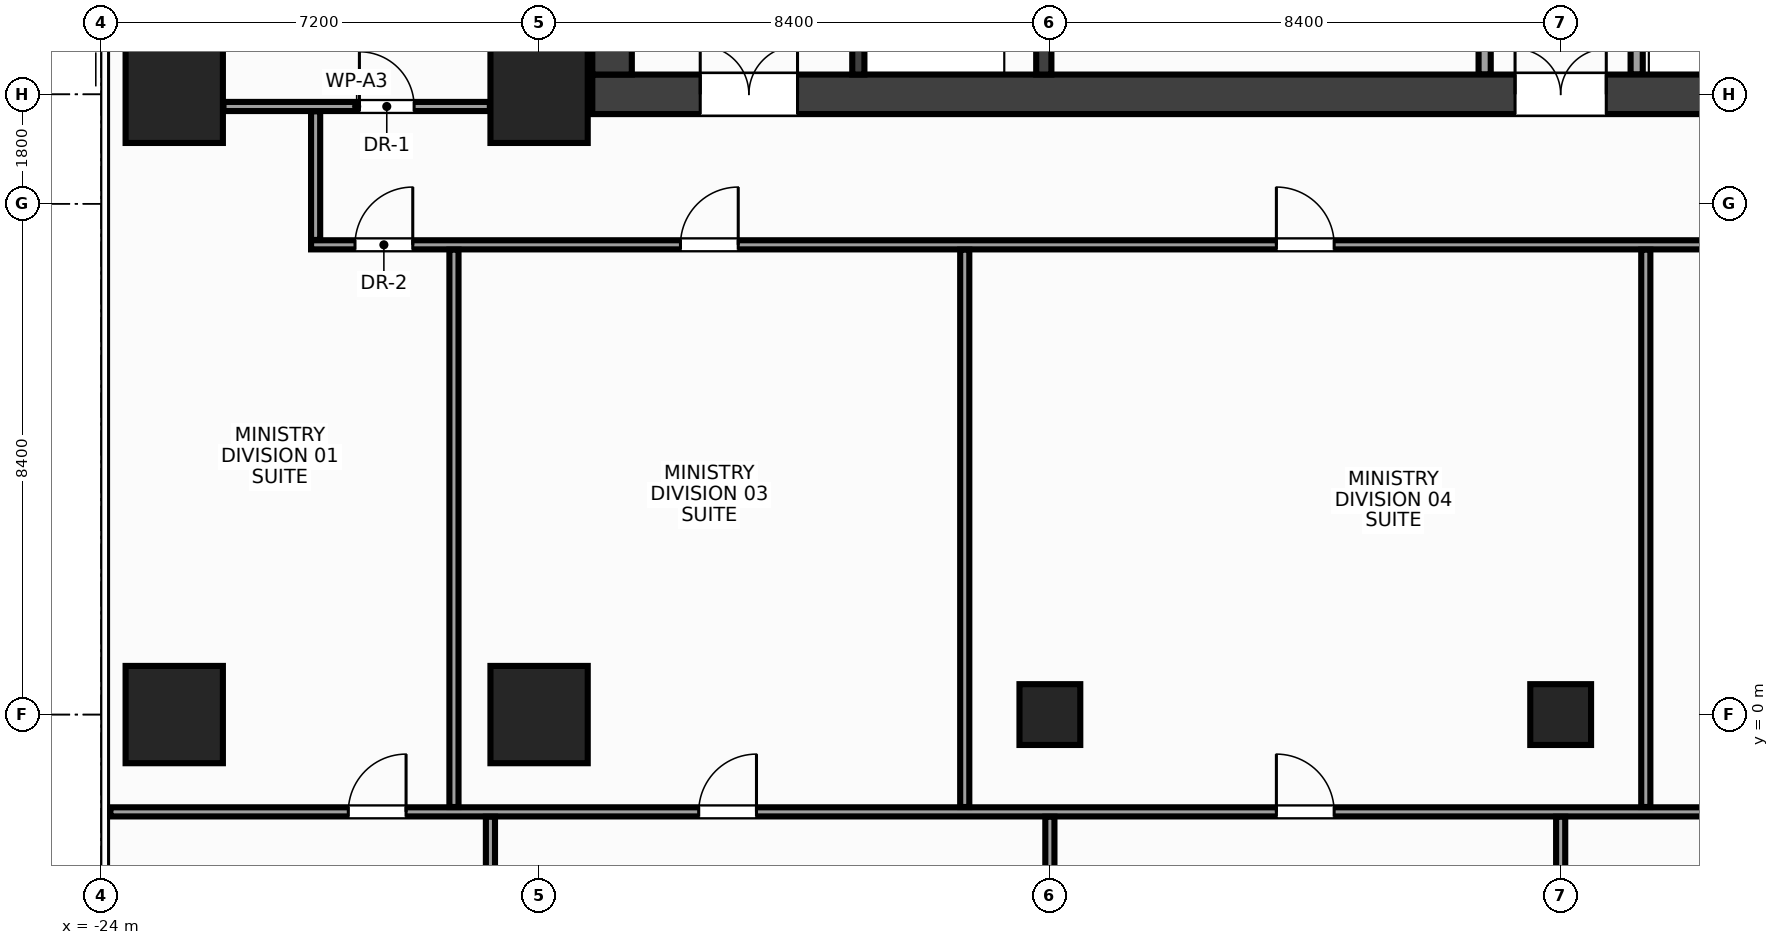
"""IFC4 building model, lengths in metres.
Left out: names, types, materials, properties, quantities, classifications, styles, units other than length and angle.
Written with IfcOpenShell. Run it as: python <this file> out.ifc"""

import sys

from ifc_helpers import new_model, si_unit, direction, frame, frame_2d, origin, origin_with_axes, origin_2d, place, context, subcontext, project, spatial, rectangle, hollow_rectangle, extrude, source, transform, mapped, element, fill, save


model = new_model("IFC4")
c1 = context("Model", 3, precision=1e-05, world=origin(), true_north=direction((0.0, 1.0)))
c2 = subcontext(c1, "Body", "Model", "MODEL_VIEW")
j1 = project(units=[si_unit("LENGTHUNIT", "METRE"), si_unit("PLANEANGLEUNIT", "RADIAN")], contexts=[c1])
p1 = place(None, origin())
s1 = spatial("IfcSite", under=j1, at=p1, CompositionType="ELEMENT")
p2 = place(p1, origin())
s2 = spatial("IfcBuilding", under=s1, at=p2, CompositionType="ELEMENT")
p3 = place(p2, frame((0.0, 0.0, 146.0)))
s3 = spatial("IfcBuildingStorey", under=s2, at=p3, CompositionType="ELEMENT", Elevation=146.0)
m1 = source(origin(), c2, "Body", "SweptSolid", [
    extrude(rectangle(XDim=31.85, YDim=0.65, at=frame_2d((15.925, 0.0))), origin(), (0.0, 0.0, 1.0), 3.6),
])
p4 = place(p3, frame((-15.925, 10.2, 0.0), z_axis=(0.0, 0.0, 1.0), x_axis=(1.0, 0.0, 0.0)))
e1 = element("IfcWall", 1, at=p4, inside=s3, PredefinedType="SHEAR", context=c2, shape_type="MappedRepresentation", body=[
    mapped(m1, transform((0.0, 0.0, 0.0), x_axis=(1.0, 0.0, 0.0), y_axis=(0.0, 1.0, 0.0), z_axis=(0.0, 0.0, 1.0), scale=1.0)),
])
p5 = place(p4, frame((1.775, 0.0, 0.0)))
e2 = element("IfcOpeningElement", 2, at=p5, cuts=e1, PredefinedType="OPENING", context=c2, shape_type="SweptSolid", body=[
    extrude(rectangle(XDim=1.6, YDim=2.15, at=frame_2d((0.8, 1.075))), frame((0.0, 0.337, 0.0), z_axis=(0.0, -1.0, 0.0), x_axis=(1.0, 0.0, 0.0)), (0.0, 0.0, 1.0), 0.674),
])
p6 = place(p4, frame((28.475, 0.0, 0.0)))
e3 = element("IfcOpeningElement", 3, at=p6, cuts=e1, PredefinedType="OPENING", context=c2, shape_type="SweptSolid", body=[
    extrude(rectangle(XDim=1.6, YDim=2.15, at=frame_2d((0.8, 1.075))), frame((0.0, 0.337, 0.0), z_axis=(0.0, -1.0, 0.0), x_axis=(1.0, 0.0, 0.0)), (0.0, 0.0, 1.0), 0.674),
])
p7 = place(p4, frame((15.175, 0.0, 0.0)))
e4 = element("IfcOpeningElement", 4, at=p7, cuts=e1, PredefinedType="OPENING", context=c2, shape_type="SweptSolid", body=[
    extrude(rectangle(XDim=1.5, YDim=2.2, at=frame_2d((0.75, 1.1))), frame((0.0, 0.337, 0.0), z_axis=(0.0, -1.0, 0.0), x_axis=(1.0, 0.0, 0.0)), (0.0, 0.0, 1.0), 0.674),
])
m2 = source(origin(), c2, "Body", "SweptSolid", [
    extrude(rectangle(XDim=12.95, YDim=0.65, at=frame_2d((6.475, 0.0))), origin(), (0.0, 0.0, 1.0), 3.6),
])
p8 = place(p3, frame((-15.6, 10.525, 0.0), z_axis=(0.0, 0.0, 1.0), x_axis=(0.0, 1.0, 0.0)))
e5 = element("IfcWall", 5, at=p8, inside=s3, PredefinedType="SHEAR", context=c2, shape_type="MappedRepresentation", body=[
    mapped(m2, transform((0.0, 0.0, 0.0), x_axis=(1.0, 0.0, 0.0), y_axis=(0.0, 1.0, 0.0), z_axis=(0.0, 0.0, 1.0), scale=1.0)),
])
m3 = source(origin(), c2, "Body", "SweptSolid", [
    extrude(rectangle(XDim=12.95, YDim=0.25, at=frame_2d((6.475, 0.0))), origin(), (0.0, 0.0, 1.0), 3.6),
])
p9 = place(p3, frame((-8.5, 10.525, 0.0), z_axis=(0.0, 0.0, 1.0), x_axis=(0.0, 1.0, 0.0)))
e6 = element("IfcWall", 6, at=p9, inside=s3, PredefinedType="SHEAR", context=c2, shape_type="MappedRepresentation", body=[
    mapped(m3, transform((0.0, 0.0, 0.0), x_axis=(1.0, 0.0, 0.0), y_axis=(0.0, 1.0, 0.0), z_axis=(0.0, 0.0, 1.0), scale=1.0)),
])
p10 = place(p9, frame((4.145, 0.0, 0.0)))
e7 = element("IfcOpeningElement", 7, at=p10, cuts=e6, PredefinedType="OPENING", context=c2, shape_type="SweptSolid", body=[
    extrude(rectangle(XDim=1.1, YDim=2.15, at=frame_2d((0.55, 1.075))), frame((0.0, 0.137, 0.0), z_axis=(0.0, -1.0, 0.0), x_axis=(1.0, 0.0, 0.0)), (0.0, 0.0, 1.0), 0.274),
])
p11 = place(p9, frame((6.065, 0.0, 0.0)))
e8 = element("IfcOpeningElement", 8, at=p11, cuts=e6, PredefinedType="OPENING", context=c2, shape_type="SweptSolid", body=[
    extrude(rectangle(XDim=1.1, YDim=2.15, at=frame_2d((0.55, 1.075))), frame((0.0, 0.137, 0.0), z_axis=(0.0, -1.0, 0.0), x_axis=(1.0, 0.0, 0.0)), (0.0, 0.0, 1.0), 0.274),
])
p12 = place(p9, frame((7.985, 0.0, 0.0)))
e9 = element("IfcOpeningElement", 9, at=p12, cuts=e6, PredefinedType="OPENING", context=c2, shape_type="SweptSolid", body=[
    extrude(rectangle(XDim=1.1, YDim=2.15, at=frame_2d((0.55, 1.075))), frame((0.0, 0.137, 0.0), z_axis=(0.0, -1.0, 0.0), x_axis=(1.0, 0.0, 0.0)), (0.0, 0.0, 1.0), 0.274),
])
m4 = source(origin(), c2, "Body", "SweptSolid", [
    extrude(rectangle(XDim=3.125, YDim=0.2, at=frame_2d((1.562, 0.0))), origin(), (0.0, 0.0, 1.0), 3.6),
])
p13 = place(p3, frame((-11.55, 10.525, 0.0), z_axis=(0.0, 0.0, 1.0), x_axis=(0.0, 1.0, 0.0)))
e10 = element("IfcWall", 10, at=p13, inside=s3, PredefinedType="SHEAR", context=c2, shape_type="MappedRepresentation", body=[
    mapped(m4, transform((0.0, 0.0, 0.0), x_axis=(1.0, 0.0, 0.0), y_axis=(0.0, 1.0, 0.0), z_axis=(0.0, 0.0, 1.0), scale=1.0)),
])
p14 = place(p13, frame((0.9, 0.0, 0.0)))
e11 = element("IfcOpeningElement", 11, at=p14, cuts=e10, PredefinedType="OPENING", context=c2, shape_type="SweptSolid", body=[
    extrude(rectangle(XDim=1.1, YDim=2.15, at=frame_2d((0.55, 1.075))), frame((0.0, 0.112, 0.0), z_axis=(0.0, -1.0, 0.0), x_axis=(1.0, 0.0, 0.0)), (0.0, 0.0, 1.0), 0.224),
])
m5 = source(origin(), c2, "Body", "SweptSolid", [
    extrude(rectangle(XDim=1.6, YDim=1.6, at=origin_2d()), origin(), (0.0, 0.0, 1.0), 3.6),
])
for number, where, z_axis, x_axis in (
    (12, (-16.8, 0.0, 0.0), (0.0, 0.0, 1.0), (1.0, 0.0, 0.0)),
    (13, (-16.8, 10.2, 0.0), (0.0, 0.0, 1.0), (1.0, 0.0, 0.0)),
    (14, (-22.8, 0.0, 0.0), (0.0, 0.0, 1.0), (1.0, 0.0, 0.0)),
    (15, (-22.8, 10.2, 0.0), (0.0, 0.0, 1.0), (1.0, 0.0, 0.0)),
):
    element("IfcColumn", number, at=place(p3, frame(where, z_axis=z_axis, x_axis=x_axis)), inside=s3, PredefinedType="COLUMN", context=c2, shape_type="MappedRepresentation", body=[
        mapped(m5, transform((0.0, 0.0, 0.0), x_axis=(1.0, 0.0, 0.0), y_axis=(0.0, 1.0, 0.0), z_axis=(0.0, 0.0, 1.0), scale=1.0)),
    ])
m6 = source(origin(), c2, "Body", "SweptSolid", [
    extrude(hollow_rectangle(XDim=1.0, YDim=1.0, WallThickness=0.045, at=origin_2d()), origin(), (0.0, 0.0, 1.0), 3.6),
])
p15 = place(p3, frame((-8.4, 0.0, 0.0), z_axis=(0.0, 0.0, 1.0), x_axis=(1.0, 0.0, 0.0)))
e16 = element("IfcColumn", 16, at=p15, inside=s3, PredefinedType="COLUMN", context=c2, shape_type="MappedRepresentation", body=[
    mapped(m6, transform((0.0, 0.0, 0.0), x_axis=(1.0, 0.0, 0.0), y_axis=(0.0, 1.0, 0.0), z_axis=(0.0, 0.0, 1.0), scale=1.0)),
])
m7 = source(origin(), c2, "Body", "SweptSolid", [
    extrude(rectangle(XDim=1.0, YDim=1.0, at=origin_2d()), origin(), (0.0, 0.0, 1.0), 3.6),
])
p16 = place(p3, origin_with_axes())
e17 = element("IfcColumn", 17, at=p16, inside=s3, PredefinedType="COLUMN", context=c2, shape_type="MappedRepresentation", body=[
    mapped(m7, transform((0.0, 0.0, 0.0), x_axis=(1.0, 0.0, 0.0), y_axis=(0.0, 1.0, 0.0), z_axis=(0.0, 0.0, 1.0), scale=1.0)),
])
m8 = source(origin(), c2, "Body", "SweptSolid", [
    extrude(rectangle(XDim=3.415, YDim=0.2, at=frame_2d((1.708, 0.0))), origin(), (0.0, 0.0, 1.0), 3.38),
])
for number, where, z_axis, x_axis in (
    (18, (-1.25, 10.525, 0.0), (0.0, 0.0, 1.0), (0.0, 1.0, 0.0)),
    (19, (1.25, 10.525, 0.0), (0.0, 0.0, 1.0), (0.0, 1.0, 0.0)),
):
    element("IfcWall", number, at=place(p3, frame(where, z_axis=z_axis, x_axis=x_axis)), inside=s3, PredefinedType="PARTITIONING", context=c2, shape_type="MappedRepresentation", body=[
        mapped(m8, transform((0.0, 0.0, 0.0), x_axis=(1.0, 0.0, 0.0), y_axis=(0.0, 1.0, 0.0), z_axis=(0.0, 0.0, 1.0), scale=1.0)),
    ])
m9 = source(origin(), c2, "Body", "SweptSolid", [
    extrude(rectangle(XDim=4.38, YDim=0.15, at=frame_2d((2.19, 0.0))), origin(), (0.0, 0.0, 1.0), 2.915),
])
p17 = place(p3, frame((-21.99, 10.0, 0.0), z_axis=(0.0, 0.0, 1.0), x_axis=(1.0, 0.0, 0.0)))
e20 = element("IfcWall", 20, at=p17, inside=s3, PredefinedType="PARTITIONING", context=c2, shape_type="MappedRepresentation", body=[
    mapped(m9, transform((0.0, 0.0, 0.0), x_axis=(1.0, 0.0, 0.0), y_axis=(0.0, 1.0, 0.0), z_axis=(0.0, 0.0, 1.0), scale=1.0)),
])
p18 = place(p17, frame((2.235, 0.0, 0.0)))
e21 = element("IfcOpeningElement", 21, at=p18, cuts=e20, PredefinedType="OPENING", context=c2, shape_type="SweptSolid", body=[
    extrude(rectangle(XDim=0.9, YDim=2.15, at=frame_2d((0.45, 1.075))), frame((0.0, 0.087, 0.0), z_axis=(0.0, -1.0, 0.0), x_axis=(1.0, 0.0, 0.0)), (0.0, 0.0, 1.0), 0.174),
])
m10 = source(origin(), c2, "Body", "SweptSolid", [
    extrude(rectangle(XDim=31.6, YDim=0.15, at=frame_2d((15.8, 0.0))), origin(), (0.0, 0.0, 1.0), 2.765),
])
p19 = place(p3, frame((-20.55, 7.725, 0.0), z_axis=(0.0, 0.0, 1.0), x_axis=(1.0, 0.0, 0.0)))
e22 = element("IfcWall", 22, at=p19, inside=s3, PredefinedType="PARTITIONING", context=c2, shape_type="MappedRepresentation", body=[
    mapped(m10, transform((0.0, 0.0, 0.0), x_axis=(1.0, 0.0, 0.0), y_axis=(0.0, 1.0, 0.0), z_axis=(0.0, 0.0, 1.0), scale=1.0)),
])
p20 = place(p19, frame((0.722, 0.0, 0.0)))
e23 = element("IfcOpeningElement", 23, at=p20, cuts=e22, PredefinedType="OPENING", context=c2, shape_type="SweptSolid", body=[
    extrude(rectangle(XDim=0.95, YDim=2.15, at=frame_2d((0.475, 1.075))), frame((0.0, 0.087, 0.0), z_axis=(0.0, -1.0, 0.0), x_axis=(1.0, 0.0, 0.0)), (0.0, 0.0, 1.0), 0.174),
])
p21 = place(p19, frame((6.075, 0.0, 0.0)))
e24 = element("IfcOpeningElement", 24, at=p21, cuts=e22, PredefinedType="OPENING", context=c2, shape_type="SweptSolid", body=[
    extrude(rectangle(XDim=0.95, YDim=2.15, at=frame_2d((0.475, 1.075))), frame((0.0, 0.087, 0.0), z_axis=(0.0, -1.0, 0.0), x_axis=(1.0, 0.0, 0.0)), (0.0, 0.0, 1.0), 0.174),
])
p22 = place(p19, frame((15.875, 0.0, 0.0)))
e25 = element("IfcOpeningElement", 25, at=p22, cuts=e22, PredefinedType="OPENING", context=c2, shape_type="SweptSolid", body=[
    extrude(rectangle(XDim=0.95, YDim=2.15, at=frame_2d((0.475, 1.075))), frame((0.0, 0.087, 0.0), z_axis=(0.0, -1.0, 0.0), x_axis=(1.0, 0.0, 0.0)), (0.0, 0.0, 1.0), 0.174),
])
p23 = place(p19, frame((26.278, 0.0, 0.0)))
e26 = element("IfcOpeningElement", 26, at=p23, cuts=e22, PredefinedType="OPENING", context=c2, shape_type="SweptSolid", body=[
    extrude(rectangle(XDim=0.95, YDim=2.15, at=frame_2d((0.475, 1.075))), frame((0.0, 0.087, 0.0), z_axis=(0.0, -1.0, 0.0), x_axis=(1.0, 0.0, 0.0)), (0.0, 0.0, 1.0), 0.174),
])
m11 = source(origin(), c2, "Body", "SweptSolid", [
    extrude(rectangle(XDim=2.115, YDim=0.15, at=frame_2d((1.058, 0.0))), origin(), (0.0, 0.0, 1.0), 3.38),
])
p24 = place(p3, frame((-20.475, 7.805, 0.0), z_axis=(0.0, 0.0, 1.0), x_axis=(0.0, 1.0, 0.0)))
e27 = element("IfcWall", 27, at=p24, inside=s3, PredefinedType="PARTITIONING", context=c2, shape_type="MappedRepresentation", body=[
    mapped(m11, transform((0.0, 0.0, 0.0), x_axis=(1.0, 0.0, 0.0), y_axis=(0.0, 1.0, 0.0), z_axis=(0.0, 0.0, 1.0), scale=1.0)),
])
m12 = source(origin(), c2, "Body", "SweptSolid", [
    extrude(rectangle(XDim=34.895, YDim=0.15, at=frame_2d((17.448, 0.0))), origin(), (0.0, 0.0, 1.0), 2.765),
])
p25 = place(p3, frame((-23.85, -1.6, 0.0), z_axis=(0.0, 0.0, 1.0), x_axis=(1.0, 0.0, 0.0)))
e28 = element("IfcWall", 28, at=p25, inside=s3, PredefinedType="PARTITIONING", context=c2, shape_type="MappedRepresentation", body=[
    mapped(m12, transform((0.0, 0.0, 0.0), x_axis=(1.0, 0.0, 0.0), y_axis=(0.0, 1.0, 0.0), z_axis=(0.0, 0.0, 1.0), scale=1.0)),
])
p26 = place(p25, frame((3.913, 0.0, 0.0)))
e29 = element("IfcOpeningElement", 29, at=p26, cuts=e28, PredefinedType="OPENING", context=c2, shape_type="SweptSolid", body=[
    extrude(rectangle(XDim=0.95, YDim=2.15, at=frame_2d((0.475, 1.075))), frame((0.0, 0.087, 0.0), z_axis=(0.0, -1.0, 0.0), x_axis=(1.0, 0.0, 0.0)), (0.0, 0.0, 1.0), 0.174),
])
p27 = place(p25, frame((9.675, 0.0, 0.0)))
e30 = element("IfcOpeningElement", 30, at=p27, cuts=e28, PredefinedType="OPENING", context=c2, shape_type="SweptSolid", body=[
    extrude(rectangle(XDim=0.95, YDim=2.15, at=frame_2d((0.475, 1.075))), frame((0.0, 0.087, 0.0), z_axis=(0.0, -1.0, 0.0), x_axis=(1.0, 0.0, 0.0)), (0.0, 0.0, 1.0), 0.174),
])
p28 = place(p25, frame((19.175, 0.0, 0.0)))
e31 = element("IfcOpeningElement", 31, at=p28, cuts=e28, PredefinedType="OPENING", context=c2, shape_type="SweptSolid", body=[
    extrude(rectangle(XDim=0.95, YDim=2.15, at=frame_2d((0.475, 1.075))), frame((0.0, 0.087, 0.0), z_axis=(0.0, -1.0, 0.0), x_axis=(1.0, 0.0, 0.0)), (0.0, 0.0, 1.0), 0.174),
])
p29 = place(p25, frame((28.275, 0.0, 0.0)))
e32 = element("IfcOpeningElement", 32, at=p29, cuts=e28, PredefinedType="OPENING", context=c2, shape_type="SweptSolid", body=[
    extrude(rectangle(XDim=0.95, YDim=2.15, at=frame_2d((0.475, 1.075))), frame((0.0, 0.087, 0.0), z_axis=(0.0, -1.0, 0.0), x_axis=(1.0, 0.0, 0.0)), (0.0, 0.0, 1.0), 0.174),
])
m13 = source(origin(), c2, "Body", "SweptSolid", [
    extrude(rectangle(XDim=9.165, YDim=0.15, at=frame_2d((4.583, 0.0))), origin(), (0.0, 0.0, 1.0), 2.915),
])
p30 = place(p3, frame((-18.2, -1.52, 0.0), z_axis=(0.0, 0.0, 1.0), x_axis=(0.0, 1.0, 0.0)))
e33 = element("IfcWall", 33, at=p30, inside=s3, PredefinedType="PARTITIONING", context=c2, shape_type="MappedRepresentation", body=[
    mapped(m13, transform((0.0, 0.0, 0.0), x_axis=(1.0, 0.0, 0.0), y_axis=(0.0, 1.0, 0.0), z_axis=(0.0, 0.0, 1.0), scale=1.0)),
])
m14 = source(origin(), c2, "Body", "SweptSolid", [
    extrude(rectangle(XDim=9.165, YDim=0.15, at=frame_2d((4.583, 0.0))), origin(), (0.0, 0.0, 1.0), 2.665),
])
for number, where, z_axis, x_axis in (
    (34, (-9.8, -1.52, 0.0), (0.0, 0.0, 1.0), (0.0, 1.0, 0.0)),
    (35, (1.4, -1.52, 0.0), (0.0, 0.0, 1.0), (0.0, 1.0, 0.0)),
):
    element("IfcWall", number, at=place(p3, frame(where, z_axis=z_axis, x_axis=x_axis)), inside=s3, PredefinedType="PARTITIONING", context=c2, shape_type="MappedRepresentation", body=[
        mapped(m14, transform((0.0, 0.0, 0.0), x_axis=(1.0, 0.0, 0.0), y_axis=(0.0, 1.0, 0.0), z_axis=(0.0, 0.0, 1.0), scale=1.0)),
    ])
m15 = source(origin(), c2, "Body", "SweptSolid", [
    extrude(rectangle(XDim=8.31, YDim=0.15, at=frame_2d((4.155, 0.0))), origin(), (0.0, 0.0, 1.0), 3.38),
])
p31 = place(p3, frame((-17.6, -9.99, 0.0), z_axis=(0.0, 0.0, 1.0), x_axis=(0.0, 1.0, 0.0)))
e36 = element("IfcWall", 36, at=p31, inside=s3, PredefinedType="PARTITIONING", context=c2, shape_type="MappedRepresentation", body=[
    mapped(m15, transform((0.0, 0.0, 0.0), x_axis=(1.0, 0.0, 0.0), y_axis=(0.0, 1.0, 0.0), z_axis=(0.0, 0.0, 1.0), scale=1.0)),
])
m16 = source(origin(), c2, "Body", "SweptSolid", [
    extrude(rectangle(XDim=8.61, YDim=0.15, at=frame_2d((4.305, 0.0))), origin(), (0.0, 0.0, 1.0), 2.765),
])
for number, where, z_axis, x_axis in (
    (37, (-8.4, -10.29, 0.0), (0.0, 0.0, 1.0), (0.0, 1.0, 0.0)),
    (38, (0.0, -10.29, 0.0), (0.0, 0.0, 1.0), (0.0, 1.0, 0.0)),
):
    element("IfcWall", number, at=place(p3, frame(where, z_axis=z_axis, x_axis=x_axis)), inside=s3, PredefinedType="PARTITIONING", context=c2, shape_type="MappedRepresentation", body=[
        mapped(m16, transform((0.0, 0.0, 0.0), x_axis=(1.0, 0.0, 0.0), y_axis=(0.0, 1.0, 0.0), z_axis=(0.0, 0.0, 1.0), scale=1.0)),
    ])
m17 = source(origin(), c2, "Body", "SweptSolid", [
    extrude(rectangle(XDim=1.6, YDim=2.15, at=frame_2d((0.8, 1.075))), frame((0.0, 0.025, 0.0), z_axis=(0.0, -1.0, 0.0), x_axis=(1.0, 0.0, 0.0)), (0.0, 0.0, 1.0), 0.05),
])
p32 = place(p5, origin())
e39 = element("IfcDoor", 39, at=p32, inside=s3, OperationType="DOUBLE_DOOR_SINGLE_SWING", PredefinedType="DOOR", context=c2, shape_type="MappedRepresentation", body=[
    mapped(m17, transform((0.0, 0.0, 0.0), x_axis=(1.0, 0.0, 0.0), y_axis=(0.0, 1.0, 0.0), z_axis=(0.0, 0.0, 1.0), scale=1.0)),
])
fill(e2, e39)
m18 = source(origin(), c2, "Body", "SweptSolid", [
    extrude(rectangle(XDim=1.5, YDim=2.2, at=frame_2d((0.75, 1.1))), frame((0.0, 0.025, 0.0), z_axis=(0.0, -1.0, 0.0), x_axis=(1.0, 0.0, 0.0)), (0.0, 0.0, 1.0), 0.05),
])
p33 = place(p7, origin())
e40 = element("IfcDoor", 40, at=p33, inside=s3, OperationType="DOUBLE_DOOR_SINGLE_SWING", PredefinedType="DOOR", context=c2, shape_type="MappedRepresentation", body=[
    mapped(m18, transform((0.0, 0.0, 0.0), x_axis=(1.0, 0.0, 0.0), y_axis=(0.0, 1.0, 0.0), z_axis=(0.0, 0.0, 1.0), scale=1.0)),
])
fill(e4, e40)
m19 = source(origin(), c2, "Body", "SweptSolid", [
    extrude(rectangle(XDim=0.9, YDim=2.15, at=frame_2d((0.45, 1.075))), frame((0.0, 0.025, 0.0), z_axis=(0.0, -1.0, 0.0), x_axis=(1.0, 0.0, 0.0)), (0.0, 0.0, 1.0), 0.05),
])
p34 = place(p18, origin())
e41 = element("IfcDoor", 41, at=p34, inside=s3, OperationType="SINGLE_SWING_LEFT", PredefinedType="DOOR", context=c2, shape_type="MappedRepresentation", body=[
    mapped(m19, transform((0.0, 0.0, 0.0), x_axis=(1.0, 0.0, 0.0), y_axis=(0.0, 1.0, 0.0), z_axis=(0.0, 0.0, 1.0), scale=1.0)),
])
fill(e21, e41)
m20 = source(origin(), c2, "Body", "SweptSolid", [
    extrude(rectangle(XDim=0.95, YDim=2.15, at=frame_2d((0.475, 1.075))), frame((0.0, 0.025, 0.0), z_axis=(0.0, -1.0, 0.0), x_axis=(1.0, 0.0, 0.0)), (0.0, 0.0, 1.0), 0.05),
])
p35 = place(p20, origin())
e42 = element("IfcDoor", 42, at=p35, inside=s3, OperationType="SINGLE_SWING_RIGHT", PredefinedType="DOOR", context=c2, shape_type="MappedRepresentation", body=[
    mapped(m20, transform((0.0, 0.0, 0.0), x_axis=(1.0, 0.0, 0.0), y_axis=(0.0, 1.0, 0.0), z_axis=(0.0, 0.0, 1.0), scale=1.0)),
])
fill(e23, e42)
p36 = place(p21, origin())
e43 = element("IfcDoor", 43, at=p36, inside=s3, OperationType="SINGLE_SWING_RIGHT", PredefinedType="DOOR", context=c2, shape_type="MappedRepresentation", body=[
    mapped(m20, transform((0.0, 0.0, 0.0), x_axis=(1.0, 0.0, 0.0), y_axis=(0.0, 1.0, 0.0), z_axis=(0.0, 0.0, 1.0), scale=1.0)),
])
fill(e24, e43)
p37 = place(p22, origin())
e44 = element("IfcDoor", 44, at=p37, inside=s3, OperationType="SINGLE_SWING_LEFT", PredefinedType="DOOR", context=c2, shape_type="MappedRepresentation", body=[
    mapped(m20, transform((0.0, 0.0, 0.0), x_axis=(1.0, 0.0, 0.0), y_axis=(0.0, 1.0, 0.0), z_axis=(0.0, 0.0, 1.0), scale=1.0)),
])
fill(e25, e44)
p38 = place(p26, origin())
e45 = element("IfcDoor", 45, at=p38, inside=s3, OperationType="SINGLE_SWING_RIGHT", PredefinedType="DOOR", context=c2, shape_type="MappedRepresentation", body=[
    mapped(m20, transform((0.0, 0.0, 0.0), x_axis=(1.0, 0.0, 0.0), y_axis=(0.0, 1.0, 0.0), z_axis=(0.0, 0.0, 1.0), scale=1.0)),
])
fill(e29, e45)
p39 = place(p27, origin())
e46 = element("IfcDoor", 46, at=p39, inside=s3, OperationType="SINGLE_SWING_RIGHT", PredefinedType="DOOR", context=c2, shape_type="MappedRepresentation", body=[
    mapped(m20, transform((0.0, 0.0, 0.0), x_axis=(1.0, 0.0, 0.0), y_axis=(0.0, 1.0, 0.0), z_axis=(0.0, 0.0, 1.0), scale=1.0)),
])
fill(e30, e46)
p40 = place(p28, origin())
e47 = element("IfcDoor", 47, at=p40, inside=s3, OperationType="SINGLE_SWING_LEFT", PredefinedType="DOOR", context=c2, shape_type="MappedRepresentation", body=[
    mapped(m20, transform((0.0, 0.0, 0.0), x_axis=(1.0, 0.0, 0.0), y_axis=(0.0, 1.0, 0.0), z_axis=(0.0, 0.0, 1.0), scale=1.0)),
])
fill(e31, e47)
save(model, sys.argv[1])
